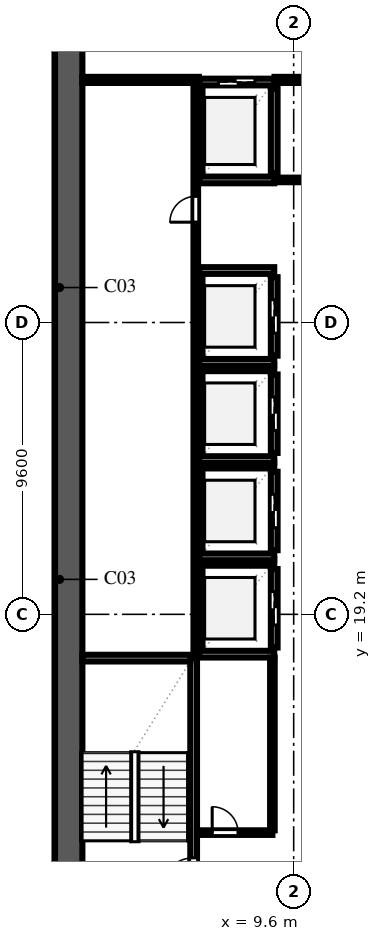
"""IFC4 building model, lengths in metres.
Left out: names, types, materials, properties, quantities, classifications, styles, units other than length and angle.
Written with IfcOpenShell. Run it as: python <this file> out.ifc"""

import sys

from ifc_helpers import new_model, si_unit, direction, frame, frame_2d, origin, place, context, subcontext, project, spatial, rectangle, extrude, element, fill, save


model = new_model("IFC4")
c1 = context("Model", 3, precision=1e-05, world=origin(), true_north=direction((0.0, 1.0)))
c2 = subcontext(c1, "Body", "Model", "MODEL_VIEW")
j1 = project(units=[si_unit("LENGTHUNIT", "METRE"), si_unit("PLANEANGLEUNIT", "RADIAN")], contexts=[c1])
p1 = place(None, origin())
s1 = spatial("IfcSite", under=j1, at=p1, CompositionType="ELEMENT")
p2 = place(p1, origin())
s2 = spatial("IfcBuilding", under=s1, at=p2, CompositionType="ELEMENT")
p3 = place(p2, frame((0.0, 0.0, 88.8)))
s3 = spatial("IfcBuildingStorey", under=s2, at=p3, CompositionType="ELEMENT", Elevation=88.8)
p4 = place(p3, frame((2.2, 9.15, 0.0), z_axis=(0.0, 0.0, 1.0), x_axis=(0.0, 1.0, 0.0)))
e1 = element("IfcWall", 1, at=p4, inside=s3, PredefinedType="SHEAR", context=c2, shape_type="SweptSolid", body=[
    extrude(rectangle(XDim=39.3, YDim=0.9, at=frame_2d((19.65, 0.0))), origin(), (0.0, 0.0, 1.0), 3.54),
])
p5 = place(p3, frame((6.31, 9.95, 0.0), z_axis=(0.0, 0.0, 1.0), x_axis=(0.0, 1.0, 0.0)))
e2 = element("IfcWall", 2, at=p5, inside=s3, PredefinedType="SOLIDWALL", context=c2, shape_type="SweptSolid", body=[
    extrude(rectangle(XDim=7.81, YDim=0.22, at=frame_2d((3.905, 0.0))), origin(), (0.0, 0.0, 1.0), 3.54),
])
p6 = place(p5, frame((0.14, 0.0, 0.0)))
e3 = element("IfcOpeningElement", 3, at=p6, cuts=e2, PredefinedType="OPENING", context=c2, shape_type="SweptSolid", body=[
    extrude(rectangle(XDim=1.1, YDim=2.2, at=frame_2d((0.55, 1.1))), frame((0.0, 0.122, 0.0), z_axis=(0.0, -1.0, 0.0), x_axis=(1.0, 0.0, 0.0)), (0.0, 0.0, 1.0), 0.244),
])
p7 = place(p3, frame((2.65, 17.76, 0.0), z_axis=(0.0, 0.0, 1.0), x_axis=(1.0, 0.0, 0.0)))
e4 = element("IfcWall", 4, at=p7, inside=s3, PredefinedType="SOLIDWALL", context=c2, shape_type="SweptSolid", body=[
    extrude(rectangle(XDim=3.55, YDim=0.22, at=frame_2d((1.775, 0.0))), origin(), (0.0, 0.0, 1.0), 3.54),
])
p8 = place(p3, frame((6.49, 18.11, 0.0), z_axis=(0.0, 0.0, 1.0), x_axis=(0.0, 1.0, 0.0)))
e5 = element("IfcWall", 5, at=p8, inside=s3, PredefinedType="SOLIDWALL", context=c2, shape_type="SweptSolid", body=[
    extrude(rectangle(XDim=2.58, YDim=0.22, at=frame_2d((1.29, 0.0))), origin(), (0.0, 0.0, 1.0), 3.54),
])
p9 = place(p3, frame((8.96, 18.11, 0.0), z_axis=(0.0, 0.0, 1.0), x_axis=(0.0, 1.0, 0.0)))
e6 = element("IfcWall", 6, at=p9, inside=s3, PredefinedType="SOLIDWALL", context=c2, shape_type="SweptSolid", body=[
    extrude(rectangle(XDim=2.58, YDim=0.22, at=frame_2d((1.29, 0.0))), origin(), (0.0, 0.0, 1.0), 3.54),
])
p10 = place(p9, frame((0.74, 0.0, 0.0)))
e7 = element("IfcOpeningElement", 7, at=p10, cuts=e6, PredefinedType="OPENING", context=c2, shape_type="SweptSolid", body=[
    extrude(rectangle(XDim=1.1, YDim=2.2, at=frame_2d((0.55, 1.1))), frame((0.0, 0.122, 0.0), z_axis=(0.0, -1.0, 0.0), x_axis=(1.0, 0.0, 0.0)), (0.0, 0.0, 1.0), 0.244),
])
for number, where, z_axis, x_axis in (
    (8, (6.49, 17.89, 0.0), (0.0, 0.0, 1.0), (1.0, 0.0, 0.0)),
    (9, (6.49, 20.91, 0.0), (0.0, 0.0, 1.0), (1.0, 0.0, 0.0)),
):
    element("IfcWall", number, at=place(p3, frame(where, z_axis=z_axis, x_axis=x_axis)), inside=s3, PredefinedType="SOLIDWALL", context=c2, shape_type="SweptSolid", body=[
        extrude(rectangle(XDim=2.47, YDim=0.22, at=frame_2d((1.235, 0.0))), origin(), (0.0, 0.0, 1.0), 3.54),
    ])
p11 = place(p3, frame((6.49, 21.31, 0.0), z_axis=(0.0, 0.0, 1.0), x_axis=(0.0, 1.0, 0.0)))
e10 = element("IfcWall", 10, at=p11, inside=s3, PredefinedType="SOLIDWALL", context=c2, shape_type="SweptSolid", body=[
    extrude(rectangle(XDim=2.58, YDim=0.22, at=frame_2d((1.29, 0.0))), origin(), (0.0, 0.0, 1.0), 3.54),
])
p12 = place(p3, frame((8.96, 21.31, 0.0), z_axis=(0.0, 0.0, 1.0), x_axis=(0.0, 1.0, 0.0)))
e11 = element("IfcWall", 11, at=p12, inside=s3, PredefinedType="SOLIDWALL", context=c2, shape_type="SweptSolid", body=[
    extrude(rectangle(XDim=2.58, YDim=0.22, at=frame_2d((1.29, 0.0))), origin(), (0.0, 0.0, 1.0), 3.54),
])
p13 = place(p12, frame((0.74, 0.0, 0.0)))
e12 = element("IfcOpeningElement", 12, at=p13, cuts=e11, PredefinedType="OPENING", context=c2, shape_type="SweptSolid", body=[
    extrude(rectangle(XDim=1.1, YDim=2.2, at=frame_2d((0.55, 1.1))), frame((0.0, 0.122, 0.0), z_axis=(0.0, -1.0, 0.0), x_axis=(1.0, 0.0, 0.0)), (0.0, 0.0, 1.0), 0.244),
])
for number, where, z_axis, x_axis in (
    (13, (6.49, 21.09, 0.0), (0.0, 0.0, 1.0), (1.0, 0.0, 0.0)),
    (14, (6.49, 24.11, 0.0), (0.0, 0.0, 1.0), (1.0, 0.0, 0.0)),
):
    element("IfcWall", number, at=place(p3, frame(where, z_axis=z_axis, x_axis=x_axis)), inside=s3, PredefinedType="SOLIDWALL", context=c2, shape_type="SweptSolid", body=[
        extrude(rectangle(XDim=2.47, YDim=0.22, at=frame_2d((1.235, 0.0))), origin(), (0.0, 0.0, 1.0), 3.54),
    ])
p14 = place(p3, frame((6.49, 24.51, 0.0), z_axis=(0.0, 0.0, 1.0), x_axis=(0.0, 1.0, 0.0)))
e15 = element("IfcWall", 15, at=p14, inside=s3, PredefinedType="SOLIDWALL", context=c2, shape_type="SweptSolid", body=[
    extrude(rectangle(XDim=2.58, YDim=0.22, at=frame_2d((1.29, 0.0))), origin(), (0.0, 0.0, 1.0), 3.54),
])
p15 = place(p3, frame((8.96, 24.51, 0.0), z_axis=(0.0, 0.0, 1.0), x_axis=(0.0, 1.0, 0.0)))
e16 = element("IfcWall", 16, at=p15, inside=s3, PredefinedType="SOLIDWALL", context=c2, shape_type="SweptSolid", body=[
    extrude(rectangle(XDim=2.58, YDim=0.22, at=frame_2d((1.29, 0.0))), origin(), (0.0, 0.0, 1.0), 3.54),
])
p16 = place(p15, frame((0.74, 0.0, 0.0)))
e17 = element("IfcOpeningElement", 17, at=p16, cuts=e16, PredefinedType="OPENING", context=c2, shape_type="SweptSolid", body=[
    extrude(rectangle(XDim=1.1, YDim=2.2, at=frame_2d((0.55, 1.1))), frame((0.0, 0.122, 0.0), z_axis=(0.0, -1.0, 0.0), x_axis=(1.0, 0.0, 0.0)), (0.0, 0.0, 1.0), 0.244),
])
for number, where, z_axis, x_axis in (
    (18, (6.49, 24.29, 0.0), (0.0, 0.0, 1.0), (1.0, 0.0, 0.0)),
    (19, (6.49, 27.31, 0.0), (0.0, 0.0, 1.0), (1.0, 0.0, 0.0)),
):
    element("IfcWall", number, at=place(p3, frame(where, z_axis=z_axis, x_axis=x_axis)), inside=s3, PredefinedType="SOLIDWALL", context=c2, shape_type="SweptSolid", body=[
        extrude(rectangle(XDim=2.47, YDim=0.22, at=frame_2d((1.235, 0.0))), origin(), (0.0, 0.0, 1.0), 3.54),
    ])
p17 = place(p3, frame((6.49, 27.71, 0.0), z_axis=(0.0, 0.0, 1.0), x_axis=(0.0, 1.0, 0.0)))
e20 = element("IfcWall", 20, at=p17, inside=s3, PredefinedType="SOLIDWALL", context=c2, shape_type="SweptSolid", body=[
    extrude(rectangle(XDim=2.58, YDim=0.22, at=frame_2d((1.29, 0.0))), origin(), (0.0, 0.0, 1.0), 3.54),
])
p18 = place(p3, frame((8.96, 27.71, 0.0), z_axis=(0.0, 0.0, 1.0), x_axis=(0.0, 1.0, 0.0)))
e21 = element("IfcWall", 21, at=p18, inside=s3, PredefinedType="SOLIDWALL", context=c2, shape_type="SweptSolid", body=[
    extrude(rectangle(XDim=2.58, YDim=0.22, at=frame_2d((1.29, 0.0))), origin(), (0.0, 0.0, 1.0), 3.54),
])
p19 = place(p18, frame((0.74, 0.0, 0.0)))
e22 = element("IfcOpeningElement", 22, at=p19, cuts=e21, PredefinedType="OPENING", context=c2, shape_type="SweptSolid", body=[
    extrude(rectangle(XDim=1.1, YDim=2.2, at=frame_2d((0.55, 1.1))), frame((0.0, 0.122, 0.0), z_axis=(0.0, -1.0, 0.0), x_axis=(1.0, 0.0, 0.0)), (0.0, 0.0, 1.0), 0.244),
])
for number, where, z_axis, x_axis in (
    (23, (6.49, 27.49, 0.0), (0.0, 0.0, 1.0), (1.0, 0.0, 0.0)),
    (24, (6.49, 30.51, 0.0), (0.0, 0.0, 1.0), (1.0, 0.0, 0.0)),
):
    element("IfcWall", number, at=place(p3, frame(where, z_axis=z_axis, x_axis=x_axis)), inside=s3, PredefinedType="SOLIDWALL", context=c2, shape_type="SweptSolid", body=[
        extrude(rectangle(XDim=2.47, YDim=0.22, at=frame_2d((1.235, 0.0))), origin(), (0.0, 0.0, 1.0), 3.54),
    ])
for number, where, z_axis, x_axis in (
    (25, (6.49, 33.71, 0.0), (0.0, 0.0, 1.0), (0.0, 1.0, 0.0)),
    (26, (8.96, 33.71, 0.0), (0.0, 0.0, 1.0), (0.0, 1.0, 0.0)),
):
    element("IfcWall", number, at=place(p3, frame(where, z_axis=z_axis, x_axis=x_axis)), inside=s3, PredefinedType="SOLIDWALL", context=c2, shape_type="SweptSolid", body=[
        extrude(rectangle(XDim=2.78, YDim=0.22, at=frame_2d((1.39, 0.0))), origin(), (0.0, 0.0, 1.0), 3.54),
    ])
p20 = place(p3, frame((6.49, 33.49, 0.0), z_axis=(0.0, 0.0, 1.0), x_axis=(1.0, 0.0, 0.0)))
e27 = element("IfcWall", 27, at=p20, inside=s3, PredefinedType="SOLIDWALL", context=c2, shape_type="SweptSolid", body=[
    extrude(rectangle(XDim=2.47, YDim=0.22, at=frame_2d((1.235, 0.0))), origin(), (0.0, 0.0, 1.0), 3.54),
])
p21 = place(p3, frame((6.49, 36.71, 0.0), z_axis=(0.0, 0.0, 1.0), x_axis=(1.0, 0.0, 0.0)))
e28 = element("IfcWall", 28, at=p21, inside=s3, PredefinedType="SOLIDWALL", context=c2, shape_type="SweptSolid", body=[
    extrude(rectangle(XDim=2.47, YDim=0.22, at=frame_2d((1.235, 0.0))), origin(), (0.0, 0.0, 1.0), 3.54),
])
p22 = place(p21, frame((0.635, 0.0, 0.0)))
e29 = element("IfcOpeningElement", 29, at=p22, cuts=e28, PredefinedType="OPENING", context=c2, shape_type="SweptSolid", body=[
    extrude(rectangle(XDim=1.2, YDim=2.2, at=frame_2d((0.6, 1.1))), frame((0.0, 0.122, 0.0), z_axis=(0.0, -1.0, 0.0), x_axis=(1.0, 0.0, 0.0)), (0.0, 0.0, 1.0), 0.244),
])
p23 = place(p3, frame((2.65, 36.78, 0.0), z_axis=(0.0, 0.0, 1.0), x_axis=(1.0, 0.0, 0.0)))
e30 = element("IfcWall", 30, at=p23, inside=s3, PredefinedType="SOLIDWALL", context=c2, shape_type="SweptSolid", body=[
    extrude(rectangle(XDim=3.83, YDim=0.2, at=frame_2d((1.915, 0.0))), origin(), (0.0, 0.0, 1.0), 3.54),
])
p24 = place(p3, frame((8.97, 36.78, 0.0), z_axis=(0.0, 0.0, 1.0), x_axis=(1.0, 0.0, 0.0)))
e31 = element("IfcWall", 31, at=p24, inside=s3, PredefinedType="SOLIDWALL", context=c2, shape_type="SweptSolid", body=[
    extrude(rectangle(XDim=1.51, YDim=0.2, at=frame_2d((0.755, 0.0))), origin(), (0.0, 0.0, 1.0), 3.54),
])
p25 = place(p3, frame((8.965, 33.49, 0.0), z_axis=(0.0, 0.0, 1.0), x_axis=(1.0, 0.0, 0.0)))
e32 = element("IfcWall", 32, at=p25, inside=s3, PredefinedType="PARTITIONING", context=c2, shape_type="SweptSolid", body=[
    extrude(rectangle(XDim=1.52, YDim=0.15, at=frame_2d((0.76, 0.0))), origin(), (0.0, 0.0, 1.0), 3.54),
])
p26 = place(p3, frame((6.42, 12.02, 0.0), z_axis=(0.0, 0.0, 1.0), x_axis=(1.0, 0.0, 0.0)))
e33 = element("IfcWall", 33, at=p26, inside=s3, PredefinedType="PARTITIONING", context=c2, shape_type="SweptSolid", body=[
    extrude(rectangle(XDim=2.48, YDim=0.15, at=frame_2d((1.24, 0.0))), origin(), (0.0, 0.0, 1.0), 3.54),
])
p27 = place(p26, frame((0.5, 0.0, 0.0)))
e34 = element("IfcOpeningElement", 34, at=p27, cuts=e33, PredefinedType="OPENING", context=c2, shape_type="SweptSolid", body=[
    extrude(rectangle(XDim=0.85, YDim=2.1, at=frame_2d((0.425, 1.05))), frame((0.0, 0.087, 0.0), z_axis=(0.0, -1.0, 0.0), x_axis=(1.0, 0.0, 0.0)), (0.0, 0.0, 1.0), 0.174),
])
p28 = place(p3, frame((8.9, 12.095, 0.0), z_axis=(0.0, 0.0, 1.0), x_axis=(0.0, 1.0, 0.0)))
e35 = element("IfcWall", 35, at=p28, inside=s3, PredefinedType="PARTITIONING", context=c2, shape_type="SweptSolid", body=[
    extrude(rectangle(XDim=5.68, YDim=0.15, at=frame_2d((2.84, 0.0))), origin(), (0.0, 0.0, 1.0), 3.54),
])
p29 = place(p3, frame((6.38, 17.8, 0.0), z_axis=(0.0, 0.0, 1.0), x_axis=(0.0, 1.0, 0.0)))
e36 = element("IfcWall", 36, at=p29, inside=s3, PredefinedType="PARTITIONING", context=c2, shape_type="SweptSolid", body=[
    extrude(rectangle(XDim=18.98, YDim=0.15, at=frame_2d((9.49, 0.0))), origin(), (0.0, 0.0, 1.0), 3.54),
])
p30 = place(p29, frame((14.3, 0.0, 0.0)))
e37 = element("IfcOpeningElement", 37, at=p30, cuts=e36, PredefinedType="OPENING", context=c2, shape_type="SweptSolid", body=[
    extrude(rectangle(XDim=0.85, YDim=2.1, at=frame_2d((0.425, 1.05))), frame((0.0, 0.087, 0.0), z_axis=(0.0, -1.0, 0.0), x_axis=(1.0, 0.0, 0.0)), (0.0, 0.0, 1.0), 0.174),
])
p31 = place(p6, origin())
e38 = element("IfcDoor", 38, at=p31, inside=s3, OperationType="SINGLE_SWING_LEFT", PredefinedType="DOOR", context=c2, shape_type="SweptSolid", body=[
    extrude(rectangle(XDim=1.1, YDim=2.2, at=frame_2d((0.55, 1.1))), frame((0.0, 0.025, 0.0), z_axis=(0.0, -1.0, 0.0), x_axis=(1.0, 0.0, 0.0)), (0.0, 0.0, 1.0), 0.05),
])
fill(e3, e38)
p32 = place(p10, origin())
e39 = element("IfcDoor", 39, at=p32, inside=s3, OperationType="DOUBLE_DOOR_SLIDING", PredefinedType="DOOR", context=c2, shape_type="SweptSolid", body=[
    extrude(rectangle(XDim=1.1, YDim=2.2, at=frame_2d((0.55, 1.1))), frame((0.0, 0.025, 0.0), z_axis=(0.0, -1.0, 0.0), x_axis=(1.0, 0.0, 0.0)), (0.0, 0.0, 1.0), 0.05),
])
fill(e7, e39)
p33 = place(p13, origin())
e40 = element("IfcDoor", 40, at=p33, inside=s3, OperationType="DOUBLE_DOOR_SLIDING", PredefinedType="DOOR", context=c2, shape_type="SweptSolid", body=[
    extrude(rectangle(XDim=1.1, YDim=2.2, at=frame_2d((0.55, 1.1))), frame((0.0, 0.025, 0.0), z_axis=(0.0, -1.0, 0.0), x_axis=(1.0, 0.0, 0.0)), (0.0, 0.0, 1.0), 0.05),
])
fill(e12, e40)
p34 = place(p16, origin())
e41 = element("IfcDoor", 41, at=p34, inside=s3, OperationType="DOUBLE_DOOR_SLIDING", PredefinedType="DOOR", context=c2, shape_type="SweptSolid", body=[
    extrude(rectangle(XDim=1.1, YDim=2.2, at=frame_2d((0.55, 1.1))), frame((0.0, 0.025, 0.0), z_axis=(0.0, -1.0, 0.0), x_axis=(1.0, 0.0, 0.0)), (0.0, 0.0, 1.0), 0.05),
])
fill(e17, e41)
p35 = place(p19, origin())
e42 = element("IfcDoor", 42, at=p35, inside=s3, OperationType="DOUBLE_DOOR_SLIDING", PredefinedType="DOOR", context=c2, shape_type="SweptSolid", body=[
    extrude(rectangle(XDim=1.1, YDim=2.2, at=frame_2d((0.55, 1.1))), frame((0.0, 0.025, 0.0), z_axis=(0.0, -1.0, 0.0), x_axis=(1.0, 0.0, 0.0)), (0.0, 0.0, 1.0), 0.05),
])
fill(e22, e42)
p36 = place(p22, origin())
e43 = element("IfcDoor", 43, at=p36, inside=s3, OperationType="DOUBLE_DOOR_SLIDING", PredefinedType="DOOR", context=c2, shape_type="SweptSolid", body=[
    extrude(rectangle(XDim=1.2, YDim=2.2, at=frame_2d((0.6, 1.1))), frame((0.0, 0.025, 0.0), z_axis=(0.0, -1.0, 0.0), x_axis=(1.0, 0.0, 0.0)), (0.0, 0.0, 1.0), 0.05),
])
fill(e29, e43)
p37 = place(p27, origin())
e44 = element("IfcDoor", 44, at=p37, inside=s3, OperationType="SINGLE_SWING_LEFT", PredefinedType="DOOR", context=c2, shape_type="SweptSolid", body=[
    extrude(rectangle(XDim=0.85, YDim=2.1, at=frame_2d((0.425, 1.05))), frame((0.0, 0.025, 0.0), z_axis=(0.0, -1.0, 0.0), x_axis=(1.0, 0.0, 0.0)), (0.0, 0.0, 1.0), 0.05),
])
fill(e34, e44)
p38 = place(p30, origin())
e45 = element("IfcDoor", 45, at=p38, inside=s3, OperationType="SINGLE_SWING_LEFT", PredefinedType="DOOR", context=c2, shape_type="SweptSolid", body=[
    extrude(rectangle(XDim=0.85, YDim=2.1, at=frame_2d((0.425, 1.05))), frame((0.0, 0.025, 0.0), z_axis=(0.0, -1.0, 0.0), x_axis=(1.0, 0.0, 0.0)), (0.0, 0.0, 1.0), 0.05),
])
fill(e37, e45)
save(model, sys.argv[1])
